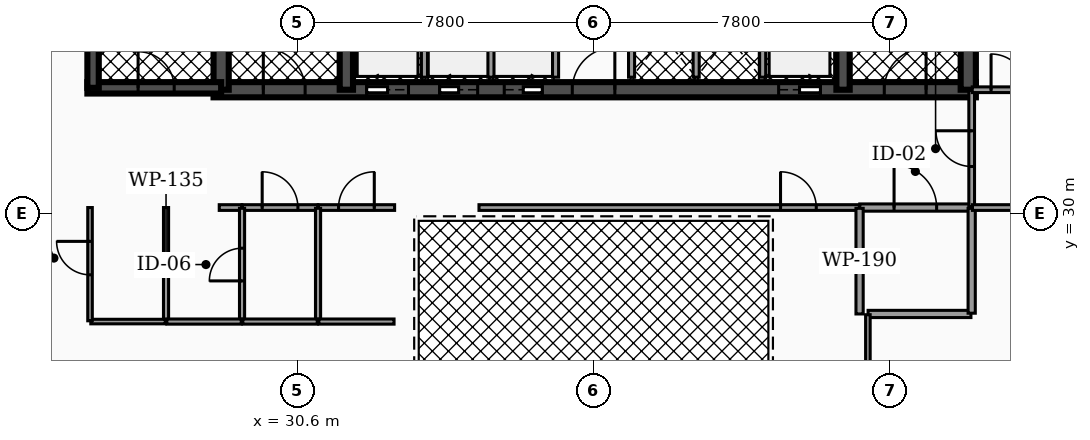
"""IFC4 building model, lengths in metres.
Left out: names, types, materials, properties, quantities, classifications, styles, units other than length and angle.
Written with IfcOpenShell. Run it as: python <this file> out.ifc"""

import sys

from ifc_helpers import new_model, si_unit, direction, frame, frame_2d, origin, place, context, subcontext, project, spatial, rectangle, extrude, element, fill, save


model = new_model("IFC4")
c1 = context("Model", 3, precision=1e-05, world=origin(), true_north=direction((0.0, 1.0)))
c2 = subcontext(c1, "Body", "Model", "MODEL_VIEW")
j1 = project(units=[si_unit("LENGTHUNIT", "METRE"), si_unit("PLANEANGLEUNIT", "RADIAN")], contexts=[c1])
p1 = place(None, origin())
s1 = spatial("IfcSite", under=j1, at=p1, CompositionType="ELEMENT")
p2 = place(p1, origin())
s2 = spatial("IfcBuilding", under=s1, at=p2, CompositionType="ELEMENT")
p3 = place(p2, frame((0.0, 0.0, 149.6)))
s3 = spatial("IfcBuildingStorey", under=s2, at=p3, CompositionType="ELEMENT", Elevation=149.6)
p4 = place(p3, frame((28.4, 33.25, 0.0), z_axis=(0.0, 0.0, 1.0), x_axis=(1.0, 0.0, 0.0)))
e1 = element("IfcWall", 1, at=p4, inside=s3, PredefinedType="SHEAR", context=c2, shape_type="SweptSolid", body=[
    extrude(rectangle(XDim=20.06, YDim=0.4, at=frame_2d((10.03, 0.0))), origin(), (0.0, 0.0, 1.0), 3.5),
])
p5 = place(p4, frame((4.03, 0.0, 0.0)))
e2 = element("IfcOpeningElement", 2, at=p5, cuts=e1, PredefinedType="OPENING", context=c2, shape_type="SweptSolid", body=[
    extrude(rectangle(XDim=1.1, YDim=2.15, at=frame_2d((0.55, 1.075))), frame((0.0, 0.21, 0.0), z_axis=(0.0, -1.0, 0.0), x_axis=(1.0, 0.0, 0.0)), (0.0, 0.0, 1.0), 0.42),
])
p6 = place(p4, frame((14.87, 0.0, 0.0)))
e3 = element("IfcOpeningElement", 3, at=p6, cuts=e1, PredefinedType="OPENING", context=c2, shape_type="SweptSolid", body=[
    extrude(rectangle(XDim=1.1, YDim=2.15, at=frame_2d((0.55, 1.075))), frame((0.0, 0.21, 0.0), z_axis=(0.0, -1.0, 0.0), x_axis=(1.0, 0.0, 0.0)), (0.0, 0.0, 1.0), 0.42),
])
p7 = place(p4, frame((5.95, 0.0, 0.0)))
e4 = element("IfcOpeningElement", 4, at=p7, cuts=e1, PredefinedType="OPENING", context=c2, shape_type="SweptSolid", body=[
    extrude(rectangle(XDim=1.0, YDim=2.1, at=frame_2d((0.5, 1.05))), frame((0.0, 0.21, 0.0), z_axis=(0.0, -1.0, 0.0), x_axis=(1.0, 0.0, 0.0)), (0.0, 0.0, 1.0), 0.42),
])
p8 = place(p4, frame((7.65, 0.0, 0.0)))
e5 = element("IfcOpeningElement", 5, at=p8, cuts=e1, PredefinedType="OPENING", context=c2, shape_type="SweptSolid", body=[
    extrude(rectangle(XDim=1.0, YDim=2.1, at=frame_2d((0.5, 1.05))), frame((0.0, 0.21, 0.0), z_axis=(0.0, -1.0, 0.0), x_axis=(1.0, 0.0, 0.0)), (0.0, 0.0, 1.0), 0.42),
])
p9 = place(p4, frame((1.31, 0.0, 0.0)))
e6 = element("IfcOpeningElement", 6, at=p9, cuts=e1, PredefinedType="OPENING", context=c2, shape_type="SweptSolid", body=[
    extrude(rectangle(XDim=1.1, YDim=2.2, at=frame_2d((0.55, 1.1))), frame((0.0, 0.21, 0.0), z_axis=(0.0, -1.0, 0.0), x_axis=(1.0, 0.0, 0.0)), (0.0, 0.0, 1.0), 0.42),
])
p10 = place(p4, frame((9.44, 0.0, 0.0)))
e7 = element("IfcOpeningElement", 7, at=p10, cuts=e1, PredefinedType="OPENING", context=c2, shape_type="SweptSolid", body=[
    extrude(rectangle(XDim=1.12, YDim=2.05, at=frame_2d((0.56, 1.025))), frame((0.0, 0.21, 0.0), z_axis=(0.0, -1.0, 0.0), x_axis=(1.0, 0.0, 0.0)), (0.0, 0.0, 1.0), 0.42),
])
p11 = place(p4, frame((17.65, 0.0, 0.0)))
e8 = element("IfcOpeningElement", 8, at=p11, cuts=e1, PredefinedType="OPENING", context=c2, shape_type="SweptSolid", body=[
    extrude(rectangle(XDim=1.1, YDim=2.2, at=frame_2d((0.55, 1.1))), frame((0.0, 0.21, 0.0), z_axis=(0.0, -1.0, 0.0), x_axis=(1.0, 0.0, 0.0)), (0.0, 0.0, 1.0), 0.42),
])
p12 = place(p3, frame((28.6, 33.25, 0.0), z_axis=(0.0, 0.0, 1.0), x_axis=(0.0, 1.0, 0.0)))
e9 = element("IfcWall", 9, at=p12, inside=s3, PredefinedType="SHEAR", context=c2, shape_type="SweptSolid", body=[
    extrude(rectangle(XDim=10.2, YDim=0.4, at=frame_2d((5.1, 0.0))), origin(), (0.0, 0.0, 1.0), 3.5),
])
for number, where, z_axis, x_axis in (
    (10, (31.895, 33.25, 0.0), (0.0, 0.0, 1.0), (0.0, 1.0, 0.0)),
    (11, (44.965, 33.25, 0.0), (0.0, 0.0, 1.0), (0.0, 1.0, 0.0)),
):
    element("IfcWall", number, at=place(p3, frame(where, z_axis=z_axis, x_axis=x_axis)), inside=s3, PredefinedType="SHEAR", context=c2, shape_type="SweptSolid", body=[
        extrude(rectangle(XDim=10.2, YDim=0.35, at=frame_2d((5.1, 0.0))), origin(), (0.0, 0.0, 1.0), 3.5),
    ])
p13 = place(p3, frame((48.26, 33.25, 0.0), z_axis=(0.0, 0.0, 1.0), x_axis=(0.0, 1.0, 0.0)))
e12 = element("IfcWall", 12, at=p13, inside=s3, PredefinedType="SHEAR", context=c2, shape_type="SweptSolid", body=[
    extrude(rectangle(XDim=10.2, YDim=0.4, at=frame_2d((5.1, 0.0))), origin(), (0.0, 0.0, 1.0), 3.5),
])
p14 = place(p3, frame((25.08, 33.3, 0.0), z_axis=(0.0, 0.0, 1.0), x_axis=(1.0, 0.0, 0.0)))
e13 = element("IfcWall", 13, at=p14, inside=s3, PredefinedType="SHEAR", context=c2, shape_type="SweptSolid", body=[
    extrude(rectangle(XDim=3.52, YDim=0.3, at=frame_2d((1.76, 0.0))), origin(), (0.0, 0.0, 1.0), 3.5),
])
p15 = place(p14, frame((1.335, 0.0, 0.0)))
e14 = element("IfcOpeningElement", 14, at=p15, cuts=e13, PredefinedType="OPENING", context=c2, shape_type="SweptSolid", body=[
    extrude(rectangle(XDim=0.95, YDim=2.2, at=frame_2d((0.475, 1.1))), frame((0.0, 0.16, 0.0), z_axis=(0.0, -1.0, 0.0), x_axis=(1.0, 0.0, 0.0)), (0.0, 0.0, 1.0), 0.32),
])
p16 = place(p3, frame((25.23, 33.3, 0.0), z_axis=(0.0, 0.0, 1.0), x_axis=(0.0, 1.0, 0.0)))
e15 = element("IfcWall", 15, at=p16, inside=s3, PredefinedType="SHEAR", context=c2, shape_type="SweptSolid", body=[
    extrude(rectangle(XDim=7.6, YDim=0.3, at=frame_2d((3.8, 0.0))), origin(), (0.0, 0.0, 1.0), 3.5),
])
for number, where, z_axis, x_axis in (
    (16, (33.95, 33.58, 0.0), (0.0, 0.0, 1.0), (0.0, 1.0, 0.0)),
    (17, (42.85, 33.58, 0.0), (0.0, 0.0, 1.0), (0.0, 1.0, 0.0)),
):
    element("IfcWall", number, at=place(p3, frame(where, z_axis=z_axis, x_axis=x_axis)), inside=s3, PredefinedType="SOLIDWALL", context=c2, shape_type="SweptSolid", body=[
        extrude(rectangle(XDim=2.45, YDim=0.16, at=frame_2d((1.225, 0.0))), origin(), (0.0, 0.0, 1.0), 2.472),
    ])
for number, where, z_axis, x_axis in (
    (18, (35.7, 33.58, 0.0), (0.0, 0.0, 1.0), (0.0, 1.0, 0.0)),
    (19, (37.4, 33.58, 0.0), (0.0, 0.0, 1.0), (0.0, 1.0, 0.0)),
    (20, (39.4, 33.58, 0.0), (0.0, 0.0, 1.0), (0.0, 1.0, 0.0)),
    (21, (41.1, 33.58, 0.0), (0.0, 0.0, 1.0), (0.0, 1.0, 0.0)),
):
    element("IfcWall", number, at=place(p3, frame(where, z_axis=z_axis, x_axis=x_axis)), inside=s3, PredefinedType="SOLIDWALL", context=c2, shape_type="SweptSolid", body=[
        extrude(rectangle(XDim=2.25, YDim=0.16, at=frame_2d((1.125, 0.0))), origin(), (0.0, 0.0, 1.0), 2.472),
    ])
p17 = place(p3, frame((45.405, 30.15, 0.0), z_axis=(0.0, 0.0, 1.0), x_axis=(1.0, 0.0, 0.0)))
e22 = element("IfcWall", 22, at=p17, inside=s3, PredefinedType="PARTITIONING", context=c2, shape_type="SweptSolid", body=[
    extrude(rectangle(XDim=2.925, YDim=0.19, at=frame_2d((1.462, 0.0))), origin(), (0.0, 0.0, 1.0), 2.457),
])
p18 = place(p17, frame((0.903, 0.0, 0.0)))
e23 = element("IfcOpeningElement", 23, at=p18, cuts=e22, PredefinedType="OPENING", context=c2, shape_type="SweptSolid", body=[
    extrude(rectangle(XDim=1.12, YDim=2.05, at=frame_2d((0.56, 1.025))), frame((0.0, 0.105, 0.0), z_axis=(0.0, -1.0, 0.0), x_axis=(1.0, 0.0, 0.0)), (0.0, 0.0, 1.0), 0.21),
])
p19 = place(p3, frame((48.35, 30.17, 0.0), z_axis=(0.0, 0.0, 1.0), x_axis=(0.0, 1.0, 0.0)))
e24 = element("IfcWall", 24, at=p19, inside=s3, PredefinedType="PARTITIONING", context=c2, shape_type="SweptSolid", body=[
    extrude(rectangle(XDim=3.06, YDim=0.15, at=frame_2d((1.53, 0.0))), origin(), (0.0, 0.0, 1.0), 2.457),
])
p20 = place(p19, frame((1.06, 0.0, 0.0)))
e25 = element("IfcOpeningElement", 25, at=p20, cuts=e24, PredefinedType="OPENING", context=c2, shape_type="SweptSolid", body=[
    extrude(rectangle(XDim=0.94, YDim=2.05, at=frame_2d((0.47, 1.025))), frame((0.0, 0.085, 0.0), z_axis=(0.0, -1.0, 0.0), x_axis=(1.0, 0.0, 0.0)), (0.0, 0.0, 1.0), 0.17),
])
p21 = place(p3, frame((28.55, 30.15, 0.0), z_axis=(0.0, 0.0, 1.0), x_axis=(1.0, 0.0, 0.0)))
e26 = element("IfcWall", 26, at=p21, inside=s3, PredefinedType="PARTITIONING", context=c2, shape_type="SweptSolid", body=[
    extrude(rectangle(XDim=0.595, YDim=0.15, at=frame_2d((0.297, 0.0))), origin(), (0.0, 0.0, 1.0), 2.457),
])
p22 = place(p3, frame((29.155, 30.15, 0.0), z_axis=(0.0, 0.0, 1.0), x_axis=(1.0, 0.0, 0.0)))
e27 = element("IfcWall", 27, at=p22, inside=s3, PredefinedType="PARTITIONING", context=c2, shape_type="SweptSolid", body=[
    extrude(rectangle(XDim=1.99, YDim=0.15, at=frame_2d((0.995, 0.0))), origin(), (0.0, 0.0, 1.0), 2.457),
])
p23 = place(p22, frame((0.525, 0.0, 0.0)))
e28 = element("IfcOpeningElement", 28, at=p23, cuts=e27, PredefinedType="OPENING", context=c2, shape_type="SweptSolid", body=[
    extrude(rectangle(XDim=0.94, YDim=2.05, at=frame_2d((0.47, 1.025))), frame((0.0, 0.085, 0.0), z_axis=(0.0, -1.0, 0.0), x_axis=(1.0, 0.0, 0.0)), (0.0, 0.0, 1.0), 0.17),
])
p24 = place(p3, frame((31.155, 30.15, 0.0), z_axis=(0.0, 0.0, 1.0), x_axis=(1.0, 0.0, 0.0)))
e29 = element("IfcWall", 29, at=p24, inside=s3, PredefinedType="PARTITIONING", context=c2, shape_type="SweptSolid", body=[
    extrude(rectangle(XDim=2.01, YDim=0.15, at=frame_2d((1.005, 0.0))), origin(), (0.0, 0.0, 1.0), 2.457),
])
p25 = place(p24, frame((0.535, 0.0, 0.0)))
e30 = element("IfcOpeningElement", 30, at=p25, cuts=e29, PredefinedType="OPENING", context=c2, shape_type="SweptSolid", body=[
    extrude(rectangle(XDim=0.94, YDim=2.05, at=frame_2d((0.47, 1.025))), frame((0.0, 0.085, 0.0), z_axis=(0.0, -1.0, 0.0), x_axis=(1.0, 0.0, 0.0)), (0.0, 0.0, 1.0), 0.17),
])
p26 = place(p3, frame((35.385, 30.15, 0.0), z_axis=(0.0, 0.0, 1.0), x_axis=(1.0, 0.0, 0.0)))
e31 = element("IfcWall", 31, at=p26, inside=s3, PredefinedType="PARTITIONING", context=c2, shape_type="SweptSolid", body=[
    extrude(rectangle(XDim=10.01, YDim=0.15, at=frame_2d((5.005, 0.0))), origin(), (0.0, 0.0, 1.0), 2.457),
])
p27 = place(p26, frame((7.935, 0.0, 0.0)))
e32 = element("IfcOpeningElement", 32, at=p27, cuts=e31, PredefinedType="OPENING", context=c2, shape_type="SweptSolid", body=[
    extrude(rectangle(XDim=0.94, YDim=2.05, at=frame_2d((0.47, 1.025))), frame((0.0, 0.085, 0.0), z_axis=(0.0, -1.0, 0.0), x_axis=(1.0, 0.0, 0.0)), (0.0, 0.0, 1.0), 0.17),
])
p28 = place(p3, frame((45.4, 27.35, 0.0), z_axis=(0.0, 0.0, 1.0), x_axis=(0.0, 1.0, 0.0)))
e33 = element("IfcWall", 33, at=p28, inside=s3, PredefinedType="PARTITIONING", context=c2, shape_type="SweptSolid", body=[
    extrude(rectangle(XDim=2.78, YDim=0.19, at=frame_2d((1.39, 0.0))), origin(), (0.0, 0.0, 1.0), 2.457),
])
p29 = place(p3, frame((45.624, 27.35, 0.0), z_axis=(0.0, 0.0, 1.0), x_axis=(1.0, 0.0, 0.0)))
e34 = element("IfcWall", 34, at=p29, inside=s3, PredefinedType="PARTITIONING", context=c2, shape_type="SweptSolid", body=[
    extrude(rectangle(XDim=2.706, YDim=0.19, at=frame_2d((1.353, 0.0))), origin(), (0.0, 0.0, 1.0), 2.457),
])
p30 = place(p3, frame((48.35, 27.37, 0.0), z_axis=(0.0, 0.0, 1.0), x_axis=(0.0, 1.0, 0.0)))
e35 = element("IfcWall", 35, at=p30, inside=s3, PredefinedType="PARTITIONING", context=c2, shape_type="SweptSolid", body=[
    extrude(rectangle(XDim=2.76, YDim=0.19, at=frame_2d((1.38, 0.0))), origin(), (0.0, 0.0, 1.0), 2.457),
])
p31 = place(p3, frame((48.37, 30.15, 0.0), z_axis=(0.0, 0.0, 1.0), x_axis=(1.0, 0.0, 0.0)))
e36 = element("IfcWall", 36, at=p31, inside=s3, PredefinedType="PARTITIONING", context=c2, shape_type="SweptSolid", body=[
    extrude(rectangle(XDim=3.26, YDim=0.15, at=frame_2d((1.63, 0.0))), origin(), (0.0, 0.0, 1.0), 2.457),
])
p32 = place(p31, frame((1.16, 0.0, 0.0)))
e37 = element("IfcOpeningElement", 37, at=p32, cuts=e36, PredefinedType="OPENING", context=c2, shape_type="SweptSolid", body=[
    extrude(rectangle(XDim=0.94, YDim=2.05, at=frame_2d((0.47, 1.025))), frame((0.0, 0.085, 0.0), z_axis=(0.0, -1.0, 0.0), x_axis=(1.0, 0.0, 0.0)), (0.0, 0.0, 1.0), 0.17),
])
p33 = place(p3, frame((48.365, 33.25, 0.0), z_axis=(0.0, 0.0, 1.0), x_axis=(1.0, 0.0, 0.0)))
e38 = element("IfcWall", 38, at=p33, inside=s3, PredefinedType="PARTITIONING", context=c2, shape_type="SweptSolid", body=[
    extrude(rectangle(XDim=1.93, YDim=0.15, at=frame_2d((0.965, 0.0))), origin(), (0.0, 0.0, 1.0), 2.457),
])
p34 = place(p33, frame((0.495, 0.0, 0.0)))
e39 = element("IfcOpeningElement", 39, at=p34, cuts=e38, PredefinedType="OPENING", context=c2, shape_type="SweptSolid", body=[
    extrude(rectangle(XDim=0.94, YDim=2.05, at=frame_2d((0.47, 1.025))), frame((0.0, 0.085, 0.0), z_axis=(0.0, -1.0, 0.0), x_axis=(1.0, 0.0, 0.0)), (0.0, 0.0, 1.0), 0.17),
])
p35 = place(p3, frame((27.15, 27.17, 0.0), z_axis=(0.0, 0.0, 1.0), x_axis=(0.0, 1.0, 0.0)))
e40 = element("IfcWall", 40, at=p35, inside=s3, PredefinedType="PARTITIONING", context=c2, shape_type="SweptSolid", body=[
    extrude(rectangle(XDim=2.98, YDim=0.135, at=frame_2d((1.49, 0.0))), origin(), (0.0, 0.0, 1.0), 2.457),
])
p36 = place(p3, frame((25.17, 27.15, 0.0), z_axis=(0.0, 0.0, 1.0), x_axis=(1.0, 0.0, 0.0)))
e41 = element("IfcWall", 41, at=p36, inside=s3, PredefinedType="PARTITIONING", context=c2, shape_type="SweptSolid", body=[
    extrude(rectangle(XDim=1.96, YDim=0.12, at=frame_2d((0.98, 0.0))), origin(), (0.0, 0.0, 1.0), 2.457),
])
p37 = place(p3, frame((25.15, 27.17, 0.0), z_axis=(0.0, 0.0, 1.0), x_axis=(0.0, 1.0, 0.0)))
e42 = element("IfcWall", 42, at=p37, inside=s3, PredefinedType="PARTITIONING", context=c2, shape_type="SweptSolid", body=[
    extrude(rectangle(XDim=2.98, YDim=0.12, at=frame_2d((1.49, 0.0))), origin(), (0.0, 0.0, 1.0), 2.457),
])
p38 = place(p37, frame((1.21, 0.0, 0.0)))
e43 = element("IfcOpeningElement", 43, at=p38, cuts=e42, PredefinedType="OPENING", context=c2, shape_type="SweptSolid", body=[
    extrude(rectangle(XDim=0.88, YDim=2.05, at=frame_2d((0.44, 1.025))), frame((0.0, 0.07, 0.0), z_axis=(0.0, -1.0, 0.0), x_axis=(1.0, 0.0, 0.0)), (0.0, 0.0, 1.0), 0.14),
])
p39 = place(p3, frame((29.15, 27.17, 0.0), z_axis=(0.0, 0.0, 1.0), x_axis=(0.0, 1.0, 0.0)))
e44 = element("IfcWall", 44, at=p39, inside=s3, PredefinedType="PARTITIONING", context=c2, shape_type="SweptSolid", body=[
    extrude(rectangle(XDim=2.96, YDim=0.135, at=frame_2d((1.48, 0.0))), origin(), (0.0, 0.0, 1.0), 2.457),
])
p40 = place(p39, frame((1.05, 0.0, 0.0)))
e45 = element("IfcOpeningElement", 45, at=p40, cuts=e44, PredefinedType="OPENING", context=c2, shape_type="SweptSolid", body=[
    extrude(rectangle(XDim=0.86, YDim=2.05, at=frame_2d((0.43, 1.025))), frame((0.0, 0.077, 0.0), z_axis=(0.0, -1.0, 0.0), x_axis=(1.0, 0.0, 0.0)), (0.0, 0.0, 1.0), 0.155),
])
p41 = place(p3, frame((27.17, 27.15, 0.0), z_axis=(0.0, 0.0, 1.0), x_axis=(1.0, 0.0, 0.0)))
e46 = element("IfcWall", 46, at=p41, inside=s3, PredefinedType="PARTITIONING", context=c2, shape_type="SweptSolid", body=[
    extrude(rectangle(XDim=1.96, YDim=0.135, at=frame_2d((0.98, 0.0))), origin(), (0.0, 0.0, 1.0), 2.457),
])
p42 = place(p3, frame((31.15, 27.17, 0.0), z_axis=(0.0, 0.0, 1.0), x_axis=(0.0, 1.0, 0.0)))
e47 = element("IfcWall", 47, at=p42, inside=s3, PredefinedType="PARTITIONING", context=c2, shape_type="SweptSolid", body=[
    extrude(rectangle(XDim=2.96, YDim=0.135, at=frame_2d((1.48, 0.0))), origin(), (0.0, 0.0, 1.0), 2.457),
])
p43 = place(p3, frame((29.17, 27.15, 0.0), z_axis=(0.0, 0.0, 1.0), x_axis=(1.0, 0.0, 0.0)))
e48 = element("IfcWall", 48, at=p43, inside=s3, PredefinedType="PARTITIONING", context=c2, shape_type="SweptSolid", body=[
    extrude(rectangle(XDim=1.96, YDim=0.135, at=frame_2d((0.98, 0.0))), origin(), (0.0, 0.0, 1.0), 2.457),
])
p44 = place(p3, frame((31.17, 27.15, 0.0), z_axis=(0.0, 0.0, 1.0), x_axis=(1.0, 0.0, 0.0)))
e49 = element("IfcWall", 49, at=p44, inside=s3, PredefinedType="PARTITIONING", context=c2, shape_type="SweptSolid", body=[
    extrude(rectangle(XDim=1.98, YDim=0.135, at=frame_2d((0.99, 0.0))), origin(), (0.0, 0.0, 1.0), 2.457),
])
p45 = place(p3, frame((45.619, 17.846, 0.0), z_axis=(0.0, 0.0, 1.0), x_axis=(0.0, 1.0, 0.0)))
e50 = element("IfcWall", 50, at=p45, inside=s3, PredefinedType="PARTITIONING", context=c2, shape_type="SweptSolid", body=[
    extrude(rectangle(XDim=9.484, YDim=0.12, at=frame_2d((4.742, 0.0))), origin(), (0.0, 0.0, 1.0), 2.457),
])
p46 = place(p5, origin())
e51 = element("IfcDoor", 51, at=p46, inside=s3, OperationType="SLIDING_TO_LEFT", PredefinedType="DOOR", context=c2, shape_type="SweptSolid", body=[
    extrude(rectangle(XDim=1.1, YDim=2.15, at=frame_2d((0.55, 1.075))), frame((0.0, 0.025, 0.0), z_axis=(0.0, -1.0, 0.0), x_axis=(1.0, 0.0, 0.0)), (0.0, 0.0, 1.0), 0.05),
])
fill(e2, e51)
p47 = place(p6, origin())
e52 = element("IfcDoor", 52, at=p47, inside=s3, OperationType="SLIDING_TO_RIGHT", PredefinedType="DOOR", context=c2, shape_type="SweptSolid", body=[
    extrude(rectangle(XDim=1.1, YDim=2.15, at=frame_2d((0.55, 1.075))), frame((0.0, 0.025, 0.0), z_axis=(0.0, -1.0, 0.0), x_axis=(1.0, 0.0, 0.0)), (0.0, 0.0, 1.0), 0.05),
])
fill(e3, e52)
p48 = place(p7, origin())
e53 = element("IfcDoor", 53, at=p48, inside=s3, OperationType="SLIDING_TO_LEFT", PredefinedType="DOOR", context=c2, shape_type="SweptSolid", body=[
    extrude(rectangle(XDim=1.0, YDim=2.1, at=frame_2d((0.5, 1.05))), frame((0.0, 0.025, 0.0), z_axis=(0.0, -1.0, 0.0), x_axis=(1.0, 0.0, 0.0)), (0.0, 0.0, 1.0), 0.05),
])
fill(e4, e53)
p49 = place(p8, origin())
e54 = element("IfcDoor", 54, at=p49, inside=s3, OperationType="SLIDING_TO_RIGHT", PredefinedType="DOOR", context=c2, shape_type="SweptSolid", body=[
    extrude(rectangle(XDim=1.0, YDim=2.1, at=frame_2d((0.5, 1.05))), frame((0.0, 0.025, 0.0), z_axis=(0.0, -1.0, 0.0), x_axis=(1.0, 0.0, 0.0)), (0.0, 0.0, 1.0), 0.05),
])
fill(e5, e54)
p50 = place(p9, origin())
e55 = element("IfcDoor", 55, at=p50, inside=s3, OperationType="SINGLE_SWING_LEFT", PredefinedType="DOOR", context=c2, shape_type="SweptSolid", body=[
    extrude(rectangle(XDim=1.1, YDim=2.2, at=frame_2d((0.55, 1.1))), frame((0.0, 0.025, 0.0), z_axis=(0.0, -1.0, 0.0), x_axis=(1.0, 0.0, 0.0)), (0.0, 0.0, 1.0), 0.05),
])
fill(e6, e55)
p51 = place(p10, origin())
e56 = element("IfcDoor", 56, at=p51, inside=s3, OperationType="SINGLE_SWING_RIGHT", PredefinedType="DOOR", context=c2, shape_type="SweptSolid", body=[
    extrude(rectangle(XDim=1.12, YDim=2.05, at=frame_2d((0.56, 1.025))), frame((0.0, 0.025, 0.0), z_axis=(0.0, -1.0, 0.0), x_axis=(1.0, 0.0, 0.0)), (0.0, 0.0, 1.0), 0.05),
])
fill(e7, e56)
p52 = place(p11, origin())
e57 = element("IfcDoor", 57, at=p52, inside=s3, OperationType="SINGLE_SWING_RIGHT", PredefinedType="DOOR", context=c2, shape_type="SweptSolid", body=[
    extrude(rectangle(XDim=1.1, YDim=2.2, at=frame_2d((0.55, 1.1))), frame((0.0, 0.025, 0.0), z_axis=(0.0, -1.0, 0.0), x_axis=(1.0, 0.0, 0.0)), (0.0, 0.0, 1.0), 0.05),
])
fill(e8, e57)
p53 = place(p15, origin())
e58 = element("IfcDoor", 58, at=p53, inside=s3, OperationType="SINGLE_SWING_LEFT", PredefinedType="DOOR", context=c2, shape_type="SweptSolid", body=[
    extrude(rectangle(XDim=0.95, YDim=2.2, at=frame_2d((0.475, 1.1))), frame((0.0, 0.025, 0.0), z_axis=(0.0, -1.0, 0.0), x_axis=(1.0, 0.0, 0.0)), (0.0, 0.0, 1.0), 0.05),
])
fill(e14, e58)
p54 = place(p18, origin())
e59 = element("IfcDoor", 59, at=p54, inside=s3, OperationType="SINGLE_SWING_LEFT", PredefinedType="DOOR", context=c2, shape_type="SweptSolid", body=[
    extrude(rectangle(XDim=1.12, YDim=2.05, at=frame_2d((0.56, 1.025))), frame((0.0, 0.025, 0.0), z_axis=(0.0, -1.0, 0.0), x_axis=(1.0, 0.0, 0.0)), (0.0, 0.0, 1.0), 0.05),
])
fill(e23, e59)
p55 = place(p20, origin())
e60 = element("IfcDoor", 60, at=p55, inside=s3, OperationType="SINGLE_SWING_RIGHT", PredefinedType="DOOR", context=c2, shape_type="SweptSolid", body=[
    extrude(rectangle(XDim=0.94, YDim=2.05, at=frame_2d((0.47, 1.025))), frame((0.0, 0.025, 0.0), z_axis=(0.0, -1.0, 0.0), x_axis=(1.0, 0.0, 0.0)), (0.0, 0.0, 1.0), 0.05),
])
fill(e25, e60)
p56 = place(p23, origin())
e61 = element("IfcDoor", 61, at=p56, inside=s3, OperationType="SINGLE_SWING_LEFT", PredefinedType="DOOR", context=c2, shape_type="SweptSolid", body=[
    extrude(rectangle(XDim=0.94, YDim=2.05, at=frame_2d((0.47, 1.025))), frame((0.0, 0.025, 0.0), z_axis=(0.0, -1.0, 0.0), x_axis=(1.0, 0.0, 0.0)), (0.0, 0.0, 1.0), 0.05),
])
fill(e28, e61)
p57 = place(p25, origin())
e62 = element("IfcDoor", 62, at=p57, inside=s3, OperationType="SINGLE_SWING_RIGHT", PredefinedType="DOOR", context=c2, shape_type="SweptSolid", body=[
    extrude(rectangle(XDim=0.94, YDim=2.05, at=frame_2d((0.47, 1.025))), frame((0.0, 0.025, 0.0), z_axis=(0.0, -1.0, 0.0), x_axis=(1.0, 0.0, 0.0)), (0.0, 0.0, 1.0), 0.05),
])
fill(e30, e62)
p58 = place(p27, origin())
e63 = element("IfcDoor", 63, at=p58, inside=s3, OperationType="SINGLE_SWING_LEFT", PredefinedType="DOOR", context=c2, shape_type="SweptSolid", body=[
    extrude(rectangle(XDim=0.94, YDim=2.05, at=frame_2d((0.47, 1.025))), frame((0.0, 0.025, 0.0), z_axis=(0.0, -1.0, 0.0), x_axis=(1.0, 0.0, 0.0)), (0.0, 0.0, 1.0), 0.05),
])
fill(e32, e63)
p59 = place(p34, origin())
e64 = element("IfcDoor", 64, at=p59, inside=s3, OperationType="SINGLE_SWING_LEFT", PredefinedType="DOOR", context=c2, shape_type="SweptSolid", body=[
    extrude(rectangle(XDim=0.94, YDim=2.05, at=frame_2d((0.47, 1.025))), frame((0.0, 0.025, 0.0), z_axis=(0.0, -1.0, 0.0), x_axis=(1.0, 0.0, 0.0)), (0.0, 0.0, 1.0), 0.05),
])
fill(e39, e64)
p60 = place(p38, origin())
e65 = element("IfcDoor", 65, at=p60, inside=s3, OperationType="SINGLE_SWING_RIGHT", PredefinedType="DOOR", context=c2, shape_type="SweptSolid", body=[
    extrude(rectangle(XDim=0.88, YDim=2.05, at=frame_2d((0.44, 1.025))), frame((0.0, 0.025, 0.0), z_axis=(0.0, -1.0, 0.0), x_axis=(1.0, 0.0, 0.0)), (0.0, 0.0, 1.0), 0.05),
])
fill(e43, e65)
p61 = place(p40, origin())
e66 = element("IfcDoor", 66, at=p61, inside=s3, OperationType="SINGLE_SWING_LEFT", PredefinedType="DOOR", context=c2, shape_type="SweptSolid", body=[
    extrude(rectangle(XDim=0.86, YDim=2.05, at=frame_2d((0.43, 1.025))), frame((0.0, 0.025, 0.0), z_axis=(0.0, -1.0, 0.0), x_axis=(1.0, 0.0, 0.0)), (0.0, 0.0, 1.0), 0.05),
])
fill(e45, e66)
save(model, sys.argv[1])
